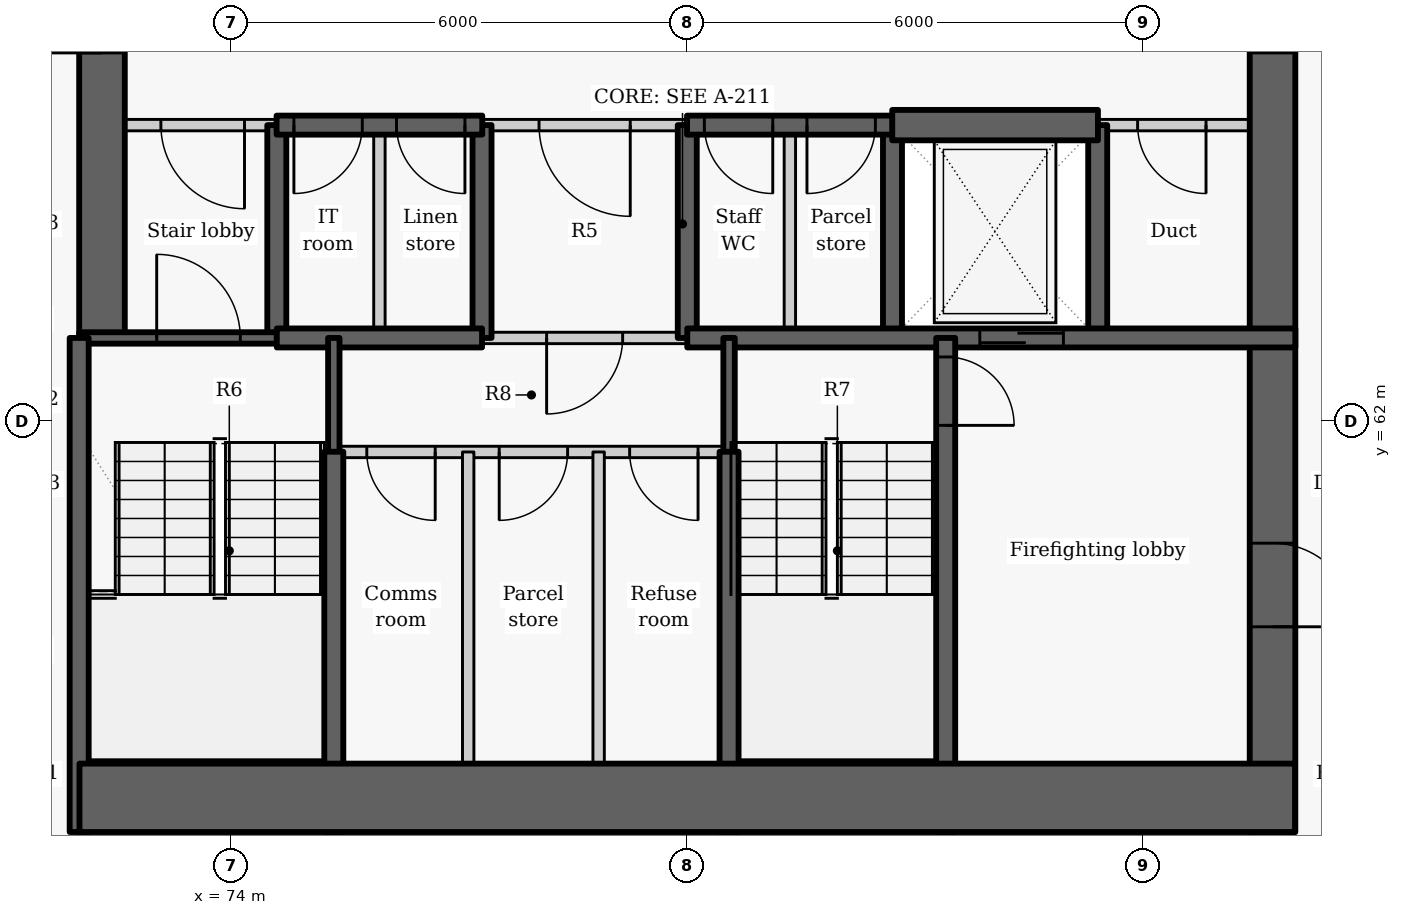
"""IFC4 building model, lengths in metres.
Left out: names, types, materials, properties, quantities, classifications, styles, units other than length and angle.
Written with IfcOpenShell. Run it as: python <this file> out.ifc"""

import sys

from ifc_helpers import new_model, si_unit, direction, frame, frame_2d, origin, place, context, subcontext, project, spatial, rectangle, extrude, element, fill, save


model = new_model("IFC4")
c1 = context("Model", 3, precision=1e-05, world=origin(), true_north=direction((0.0, 1.0)))
c2 = subcontext(c1, "Body", "Model", "MODEL_VIEW")
j1 = project(units=[si_unit("LENGTHUNIT", "METRE"), si_unit("PLANEANGLEUNIT", "RADIAN")], contexts=[c1])
p1 = place(None, origin())
s1 = spatial("IfcSite", under=j1, at=p1, CompositionType="ELEMENT")
p2 = place(p1, origin())
s2 = spatial("IfcBuilding", under=s1, at=p2, CompositionType="ELEMENT")
p3 = place(p2, frame((0.0, 0.0, 44.7)))
s3 = spatial("IfcBuildingStorey", under=s2, at=p3, CompositionType="ELEMENT", Elevation=44.7)
p4 = place(p3, frame((74.6, 63.1, -0.275), z_axis=(0.0, 0.0, 1.0), x_axis=(0.0, 1.0, 0.0)))
e1 = element("IfcWall", 1, at=p4, inside=s3, PredefinedType="SHEAR", context=c2, shape_type="SweptSolid", body=[
    extrude(rectangle(XDim=2.8, YDim=0.25, at=frame_2d((1.4, 0.0))), origin(), (0.0, 0.0, 1.0), 3.3),
])
p5 = place(p3, frame((72.3, 63.1, -0.275), z_axis=(0.0, 0.0, 1.0), x_axis=(0.0, 1.0, 0.0)))
e2 = element("IfcWall", 2, at=p5, inside=s3, PredefinedType="SHEAR", context=c2, shape_type="SweptSolid", body=[
    extrude(rectangle(XDim=9.1, YDim=0.6, at=frame_2d((4.55, 0.0))), origin(), (0.0, 0.0, 1.0), 3.3),
])
p6 = place(p5, frame((3.75, 0.0, 0.275)))
e3 = element("IfcOpeningElement", 3, at=p6, cuts=e2, PredefinedType="OPENING", context=c2, shape_type="SweptSolid", body=[
    extrude(rectangle(XDim=1.5, YDim=2.1, at=frame_2d((0.75, 1.05))), frame((0.0, 0.31, 0.0), z_axis=(0.0, -1.0, 0.0), x_axis=(1.0, 0.0, 0.0)), (0.0, 0.0, 1.0), 0.62),
])
for number, where, z_axis, x_axis in (
    (4, (77.3, 63.1, -0.275), (0.0, 0.0, 1.0), (0.0, 1.0, 0.0)),
    (5, (80.0, 63.1, -0.275), (0.0, 0.0, 1.0), (0.0, 1.0, 0.0)),
    (6, (82.7, 63.1, -0.275), (0.0, 0.0, 1.0), (0.0, 1.0, 0.0)),
    (7, (85.4, 63.1, -0.275), (0.0, 0.0, 1.0), (0.0, 1.0, 0.0)),
):
    element("IfcWall", number, at=place(p3, frame(where, z_axis=z_axis, x_axis=x_axis)), inside=s3, PredefinedType="SHEAR", context=c2, shape_type="SweptSolid", body=[
        extrude(rectangle(XDim=2.8, YDim=0.25, at=frame_2d((1.4, 0.0))), origin(), (0.0, 0.0, 1.0), 3.3),
    ])
p7 = place(p3, frame((87.7, 72.2, -0.275), z_axis=(0.0, 0.0, 1.0), x_axis=(0.0, -1.0, 0.0)))
e8 = element("IfcWall", 8, at=p7, inside=s3, PredefinedType="SHEAR", context=c2, shape_type="SweptSolid", body=[
    extrude(rectangle(XDim=15.6, YDim=0.6, at=frame_2d((7.8, 0.0))), origin(), (0.0, 0.0, 1.0), 3.3),
])
p8 = place(p7, frame((3.85, 0.0, 0.275)))
e9 = element("IfcOpeningElement", 9, at=p8, cuts=e8, PredefinedType="OPENING", context=c2, shape_type="SweptSolid", body=[
    extrude(rectangle(XDim=1.5, YDim=2.1, at=frame_2d((0.75, 1.05))), frame((0.0, 0.31, 0.0), z_axis=(0.0, -1.0, 0.0), x_axis=(1.0, 0.0, 0.0)), (0.0, 0.0, 1.0), 0.62),
])
p9 = place(p7, frame((11.8, 0.0, 0.275)))
e10 = element("IfcOpeningElement", 10, at=p9, cuts=e8, PredefinedType="OPENING", context=c2, shape_type="SweptSolid", body=[
    extrude(rectangle(XDim=1.1, YDim=2.1, at=frame_2d((0.55, 1.05))), frame((0.0, 0.31, 0.0), z_axis=(0.0, -1.0, 0.0), x_axis=(1.0, 0.0, 0.0)), (0.0, 0.0, 1.0), 0.62),
])
p10 = place(p3, frame((74.603, 65.9, 0.0), z_axis=(0.0, 0.0, 1.0), x_axis=(-1.0, 0.0, 0.0)))
e11 = element("IfcWall", 11, at=p10, inside=s3, PredefinedType="PARTITIONING", context=c2, shape_type="SweptSolid", body=[
    extrude(rectangle(XDim=2.603, YDim=0.15, at=frame_2d((1.302, 0.0))), origin(), (0.0, 0.0, 1.0), 3.025),
])
p11 = place(p10, frame((0.428, 0.0, 0.0)))
e12 = element("IfcOpeningElement", 12, at=p11, cuts=e11, PredefinedType="OPENING", context=c2, shape_type="SweptSolid", body=[
    extrude(rectangle(XDim=1.1, YDim=2.1, at=frame_2d((0.55, 1.05))), frame((0.0, 0.085, 0.0), z_axis=(0.0, -1.0, 0.0), x_axis=(1.0, 0.0, 0.0)), (0.0, 0.0, 1.0), 0.17),
])
p12 = place(p3, frame((80.003, 65.9, 0.0), z_axis=(0.0, 0.0, 1.0), x_axis=(-1.0, 0.0, 0.0)))
e13 = element("IfcWall", 13, at=p12, inside=s3, PredefinedType="PARTITIONING", context=c2, shape_type="SweptSolid", body=[
    extrude(rectangle(XDim=2.706, YDim=0.15, at=frame_2d((1.353, 0.0))), origin(), (0.0, 0.0, 1.0), 3.025),
])
p13 = place(p12, frame((0.753, 0.0, 0.0)))
e14 = element("IfcOpeningElement", 14, at=p13, cuts=e13, PredefinedType="OPENING", context=c2, shape_type="SweptSolid", body=[
    extrude(rectangle(XDim=1.2, YDim=2.1, at=frame_2d((0.6, 1.05))), frame((0.0, 0.085, 0.0), z_axis=(0.0, -1.0, 0.0), x_axis=(1.0, 0.0, 0.0)), (0.0, 0.0, 1.0), 0.17),
])
p14 = place(p3, frame((88.0, 65.9, 0.0), z_axis=(0.0, 0.0, 1.0), x_axis=(-1.0, 0.0, 0.0)))
e15 = element("IfcWall", 15, at=p14, inside=s3, PredefinedType="PARTITIONING", context=c2, shape_type="SweptSolid", body=[
    extrude(rectangle(XDim=2.603, YDim=0.15, at=frame_2d((1.302, 0.0))), origin(), (0.0, 0.0, 1.0), 3.025),
])
p15 = place(p14, frame((1.175, 0.0, 0.0)))
e16 = element("IfcOpeningElement", 16, at=p15, cuts=e15, PredefinedType="OPENING", context=c2, shape_type="SweptSolid", body=[
    extrude(rectangle(XDim=0.9, YDim=2.1, at=frame_2d((0.45, 1.05))), frame((0.0, 0.085, 0.0), z_axis=(0.0, -1.0, 0.0), x_axis=(1.0, 0.0, 0.0)), (0.0, 0.0, 1.0), 0.17),
])
p16 = place(p3, frame((77.303, 65.9, -0.275), z_axis=(0.0, 0.0, 1.0), x_axis=(-1.0, 0.0, 0.0)))
e17 = element("IfcWall", 17, at=p16, inside=s3, PredefinedType="SHEAR", context=c2, shape_type="SweptSolid", body=[
    extrude(rectangle(XDim=2.706, YDim=0.25, at=frame_2d((1.353, 0.0))), origin(), (0.0, 0.0, 1.0), 3.3),
])
p17 = place(p16, frame((1.578, 0.0, 0.275)))
e18 = element("IfcOpeningElement", 18, at=p17, cuts=e17, PredefinedType="OPENING", context=c2, shape_type="SweptSolid", body=[
    extrude(rectangle(XDim=0.9, YDim=2.1, at=frame_2d((0.45, 1.05))), frame((0.0, 0.135, 0.0), z_axis=(0.0, -1.0, 0.0), x_axis=(1.0, 0.0, 0.0)), (0.0, 0.0, 1.0), 0.27),
])
p18 = place(p16, frame((0.228, 0.0, 0.275)))
e19 = element("IfcOpeningElement", 19, at=p18, cuts=e17, PredefinedType="OPENING", context=c2, shape_type="SweptSolid", body=[
    extrude(rectangle(XDim=0.9, YDim=2.1, at=frame_2d((0.45, 1.05))), frame((0.0, 0.135, 0.0), z_axis=(0.0, -1.0, 0.0), x_axis=(1.0, 0.0, 0.0)), (0.0, 0.0, 1.0), 0.27),
])
p19 = place(p3, frame((82.703, 65.9, -0.275), z_axis=(0.0, 0.0, 1.0), x_axis=(-1.0, 0.0, 0.0)))
e20 = element("IfcWall", 20, at=p19, inside=s3, PredefinedType="SHEAR", context=c2, shape_type="SweptSolid", body=[
    extrude(rectangle(XDim=2.706, YDim=0.25, at=frame_2d((1.353, 0.0))), origin(), (0.0, 0.0, 1.0), 3.3),
])
p20 = place(p19, frame((1.578, 0.0, 0.275)))
e21 = element("IfcOpeningElement", 21, at=p20, cuts=e20, PredefinedType="OPENING", context=c2, shape_type="SweptSolid", body=[
    extrude(rectangle(XDim=0.9, YDim=2.1, at=frame_2d((0.45, 1.05))), frame((0.0, 0.135, 0.0), z_axis=(0.0, -1.0, 0.0), x_axis=(1.0, 0.0, 0.0)), (0.0, 0.0, 1.0), 0.27),
])
p21 = place(p19, frame((0.228, 0.0, 0.275)))
e22 = element("IfcOpeningElement", 22, at=p21, cuts=e20, PredefinedType="OPENING", context=c2, shape_type="SweptSolid", body=[
    extrude(rectangle(XDim=0.9, YDim=2.1, at=frame_2d((0.45, 1.05))), frame((0.0, 0.135, 0.0), z_axis=(0.0, -1.0, 0.0), x_axis=(1.0, 0.0, 0.0)), (0.0, 0.0, 1.0), 0.27),
])
p22 = place(p3, frame((82.697, 65.9, -0.275), z_axis=(0.0, 0.0, 1.0), x_axis=(1.0, 0.0, 0.0)))
e23 = element("IfcWall", 23, at=p22, inside=s3, PredefinedType="SHEAR", context=c2, shape_type="SweptSolid", body=[
    extrude(rectangle(XDim=2.706, YDim=0.4, at=frame_2d((1.353, 0.0))), origin(), (0.0, 0.0, 1.0), 3.3),
])
p23 = place(p3, frame((72.0, 63.1, -0.275), z_axis=(0.0, 0.0, 1.0), x_axis=(1.0, 0.0, 0.0)))
e24 = element("IfcWall", 24, at=p23, inside=s3, PredefinedType="SHEAR", context=c2, shape_type="SweptSolid", body=[
    extrude(rectangle(XDim=2.6, YDim=0.15, at=frame_2d((1.3, 0.0))), origin(), (0.0, 0.0, 1.0), 3.3),
])
p24 = place(p23, frame((1.02, 0.0, 0.275)))
e25 = element("IfcOpeningElement", 25, at=p24, cuts=e24, PredefinedType="OPENING", context=c2, shape_type="SweptSolid", body=[
    extrude(rectangle(XDim=1.1, YDim=2.1, at=frame_2d((0.55, 1.05))), frame((0.0, 0.085, 0.0), z_axis=(0.0, -1.0, 0.0), x_axis=(1.0, 0.0, 0.0)), (0.0, 0.0, 1.0), 0.17),
])
p25 = place(p3, frame((75.95, 63.1, 0.0), z_axis=(0.0, 0.0, 1.0), x_axis=(0.0, 1.0, 0.0)))
e26 = element("IfcWall", 26, at=p25, inside=s3, PredefinedType="PARTITIONING", context=c2, shape_type="SweptSolid", body=[
    extrude(rectangle(XDim=2.8, YDim=0.15, at=frame_2d((1.4, 0.0))), origin(), (0.0, 0.0, 1.0), 3.025),
])
p26 = place(p3, frame((74.6, 63.1, -0.275), z_axis=(0.0, 0.0, 1.0), x_axis=(1.0, 0.0, 0.0)))
e27 = element("IfcWall", 27, at=p26, inside=s3, PredefinedType="SHEAR", context=c2, shape_type="SweptSolid", body=[
    extrude(rectangle(XDim=2.7, YDim=0.25, at=frame_2d((1.35, 0.0))), origin(), (0.0, 0.0, 1.0), 3.3),
])
p27 = place(p3, frame((80.0, 63.1, -0.275), z_axis=(0.0, 0.0, 1.0), x_axis=(1.0, 0.0, 0.0)))
e28 = element("IfcWall", 28, at=p27, inside=s3, PredefinedType="SHEAR", context=c2, shape_type="SweptSolid", body=[
    extrude(rectangle(XDim=8.0, YDim=0.25, at=frame_2d((4.0, 0.0))), origin(), (0.0, 0.0, 1.0), 3.3),
])
p28 = place(p27, frame((3.849, 0.0, 0.275)))
e29 = element("IfcOpeningElement", 29, at=p28, cuts=e28, PredefinedType="OPENING", context=c2, shape_type="SweptSolid", body=[
    extrude(rectangle(XDim=1.1, YDim=2.1, at=frame_2d((0.55, 1.05))), frame((0.0, 0.135, 0.0), z_axis=(0.0, -1.0, 0.0), x_axis=(1.0, 0.0, 0.0)), (0.0, 0.0, 1.0), 0.27),
])
p29 = place(p3, frame((80.0, 63.1, 0.0), z_axis=(0.0, 0.0, 1.0), x_axis=(-1.0, 0.0, 0.0)))
e30 = element("IfcWall", 30, at=p29, inside=s3, PredefinedType="PARTITIONING", context=c2, shape_type="SweptSolid", body=[
    extrude(rectangle(XDim=2.7, YDim=0.15, at=frame_2d((1.35, 0.0))), origin(), (0.0, 0.0, 1.0), 3.025),
])
p30 = place(p29, frame((0.85, 0.0, 0.0)))
e31 = element("IfcOpeningElement", 31, at=p30, cuts=e30, PredefinedType="OPENING", context=c2, shape_type="SweptSolid", body=[
    extrude(rectangle(XDim=1.0, YDim=2.1, at=frame_2d((0.5, 1.05))), frame((0.0, 0.085, 0.0), z_axis=(0.0, -1.0, 0.0), x_axis=(1.0, 0.0, 0.0)), (0.0, 0.0, 1.0), 0.17),
])
p31 = place(p3, frame((81.35, 63.1, 0.0), z_axis=(0.0, 0.0, 1.0), x_axis=(0.0, 1.0, 0.0)))
e32 = element("IfcWall", 32, at=p31, inside=s3, PredefinedType="PARTITIONING", context=c2, shape_type="SweptSolid", body=[
    extrude(rectangle(XDim=2.8, YDim=0.15, at=frame_2d((1.4, 0.0))), origin(), (0.0, 0.0, 1.0), 3.025),
])
p32 = place(p3, frame((75.35, 61.597, -0.275), z_axis=(0.0, 0.0, 1.0), x_axis=(0.0, 1.0, 0.0)))
e33 = element("IfcWall", 33, at=p32, inside=s3, PredefinedType="SHEAR", context=c2, shape_type="SweptSolid", body=[
    extrude(rectangle(XDim=1.503, YDim=0.15, at=frame_2d((0.751, 0.0))), origin(), (0.0, 0.0, 1.0), 3.3),
])
p33 = place(p3, frame((75.35, 56.6, -0.275), z_axis=(0.0, 0.0, 1.0), x_axis=(0.0, 1.0, 0.0)))
e34 = element("IfcWall", 34, at=p33, inside=s3, PredefinedType="SHEAR", context=c2, shape_type="SweptSolid", body=[
    extrude(rectangle(XDim=5.003, YDim=0.25, at=frame_2d((2.501, 0.0))), origin(), (0.0, 0.0, 1.0), 3.3),
])
p34 = place(p3, frame((72.0, 56.6, -0.275), z_axis=(0.0, 0.0, 1.0), x_axis=(0.0, 1.0, 0.0)))
e35 = element("IfcWall", 35, at=p34, inside=s3, PredefinedType="SHEAR", context=c2, shape_type="SweptSolid", body=[
    extrude(rectangle(XDim=6.5, YDim=0.25, at=frame_2d((3.25, 0.0))), origin(), (0.0, 0.0, 1.0), 3.3),
])
p35 = place(p3, frame((83.4, 63.1, -0.275), z_axis=(0.0, 0.0, 1.0), x_axis=(0.0, -1.0, 0.0)))
e36 = element("IfcWall", 36, at=p35, inside=s3, PredefinedType="SHEAR", context=c2, shape_type="SweptSolid", body=[
    extrude(rectangle(XDim=6.5, YDim=0.25, at=frame_2d((3.25, 0.0))), origin(), (0.0, 0.0, 1.0), 3.3),
])
p36 = place(p35, frame((0.25, 0.0, 0.275)))
e37 = element("IfcOpeningElement", 37, at=p36, cuts=e36, PredefinedType="OPENING", context=c2, shape_type="SweptSolid", body=[
    extrude(rectangle(XDim=0.9, YDim=2.1, at=frame_2d((0.45, 1.05))), frame((0.0, 0.135, 0.0), z_axis=(0.0, -1.0, 0.0), x_axis=(1.0, 0.0, 0.0)), (0.0, 0.0, 1.0), 0.27),
])
p37 = place(p3, frame((80.55, 61.597, -0.275), z_axis=(0.0, 0.0, 1.0), x_axis=(0.0, 1.0, 0.0)))
e38 = element("IfcWall", 38, at=p37, inside=s3, PredefinedType="SHEAR", context=c2, shape_type="SweptSolid", body=[
    extrude(rectangle(XDim=1.503, YDim=0.15, at=frame_2d((0.751, 0.0))), origin(), (0.0, 0.0, 1.0), 3.3),
])
p38 = place(p3, frame((80.55, 56.6, -0.275), z_axis=(0.0, 0.0, 1.0), x_axis=(0.0, 1.0, 0.0)))
e39 = element("IfcWall", 39, at=p38, inside=s3, PredefinedType="SHEAR", context=c2, shape_type="SweptSolid", body=[
    extrude(rectangle(XDim=5.003, YDim=0.25, at=frame_2d((2.501, 0.0))), origin(), (0.0, 0.0, 1.0), 3.3),
])
p39 = place(p3, frame((80.55, 61.6, 0.0), z_axis=(0.0, 0.0, 1.0), x_axis=(-1.0, 0.0, 0.0)))
e40 = element("IfcWall", 40, at=p39, inside=s3, PredefinedType="PARTITIONING", context=c2, shape_type="SweptSolid", body=[
    extrude(rectangle(XDim=5.2, YDim=0.15, at=frame_2d((2.6, 0.0))), origin(), (0.0, 0.0, 1.0), 3.025),
])
p40 = place(p39, frame((3.866, 0.0, 0.0)))
e41 = element("IfcOpeningElement", 41, at=p40, cuts=e40, PredefinedType="OPENING", context=c2, shape_type="SweptSolid", body=[
    extrude(rectangle(XDim=0.9, YDim=2.1, at=frame_2d((0.45, 1.05))), frame((0.0, 0.085, 0.0), z_axis=(0.0, -1.0, 0.0), x_axis=(1.0, 0.0, 0.0)), (0.0, 0.0, 1.0), 0.17),
])
p41 = place(p39, frame((2.124, 0.0, 0.0)))
e42 = element("IfcOpeningElement", 42, at=p41, cuts=e40, PredefinedType="OPENING", context=c2, shape_type="SweptSolid", body=[
    extrude(rectangle(XDim=0.9, YDim=2.1, at=frame_2d((0.45, 1.05))), frame((0.0, 0.085, 0.0), z_axis=(0.0, -1.0, 0.0), x_axis=(1.0, 0.0, 0.0)), (0.0, 0.0, 1.0), 0.17),
])
p42 = place(p39, frame((0.408, 0.0, 0.0)))
e43 = element("IfcOpeningElement", 43, at=p42, cuts=e40, PredefinedType="OPENING", context=c2, shape_type="SweptSolid", body=[
    extrude(rectangle(XDim=0.9, YDim=2.1, at=frame_2d((0.45, 1.05))), frame((0.0, 0.085, 0.0), z_axis=(0.0, -1.0, 0.0), x_axis=(1.0, 0.0, 0.0)), (0.0, 0.0, 1.0), 0.17),
])
for number, where, z_axis, x_axis in (
    (44, (77.118, 56.6, 0.0), (0.0, 0.0, 1.0), (0.0, 1.0, 0.0)),
    (45, (78.834, 56.6, 0.0), (0.0, 0.0, 1.0), (0.0, 1.0, 0.0)),
):
    element("IfcWall", number, at=place(p3, frame(where, z_axis=z_axis, x_axis=x_axis)), inside=s3, PredefinedType="PARTITIONING", context=c2, shape_type="SweptSolid", body=[
        extrude(rectangle(XDim=5.0, YDim=0.15, at=frame_2d((2.5, 0.0))), origin(), (0.0, 0.0, 1.0), 3.025),
    ])
p43 = place(p3, frame((72.004, 57.05, -0.275), z_axis=(0.0, 0.0, 1.0), x_axis=(1.0, 0.0, 0.0)))
e46 = element("IfcWall", 46, at=p43, inside=s3, PredefinedType="SHEAR", context=c2, shape_type="SweptSolid", body=[
    extrude(rectangle(XDim=15.992, YDim=0.9, at=frame_2d((7.996, 0.0))), origin(), (0.0, 0.0, 1.0), 3.3),
])
p44 = place(p11, origin())
e47 = element("IfcDoor", 47, at=p44, inside=s3, OperationType="SINGLE_SWING_LEFT", PredefinedType="DOOR", context=c2, shape_type="SweptSolid", body=[
    extrude(rectangle(XDim=1.1, YDim=2.1, at=frame_2d((0.55, 1.05))), frame((0.0, 0.025, 0.0), z_axis=(0.0, -1.0, 0.0), x_axis=(1.0, 0.0, 0.0)), (0.0, 0.0, 1.0), 0.05),
])
fill(e12, e47)
p45 = place(p17, origin())
e48 = element("IfcDoor", 48, at=p45, inside=s3, OperationType="SINGLE_SWING_RIGHT", PredefinedType="DOOR", context=c2, shape_type="SweptSolid", body=[
    extrude(rectangle(XDim=0.9, YDim=2.1, at=frame_2d((0.45, 1.05))), frame((0.0, 0.025, 0.0), z_axis=(0.0, -1.0, 0.0), x_axis=(1.0, 0.0, 0.0)), (0.0, 0.0, 1.0), 0.05),
])
fill(e18, e48)
p46 = place(p18, origin())
e49 = element("IfcDoor", 49, at=p46, inside=s3, OperationType="SINGLE_SWING_LEFT", PredefinedType="DOOR", context=c2, shape_type="SweptSolid", body=[
    extrude(rectangle(XDim=0.9, YDim=2.1, at=frame_2d((0.45, 1.05))), frame((0.0, 0.025, 0.0), z_axis=(0.0, -1.0, 0.0), x_axis=(1.0, 0.0, 0.0)), (0.0, 0.0, 1.0), 0.05),
])
fill(e19, e49)
p47 = place(p13, origin())
e50 = element("IfcDoor", 50, at=p47, inside=s3, OperationType="DOUBLE_DOOR_SINGLE_SWING", PredefinedType="DOOR", context=c2, shape_type="SweptSolid", body=[
    extrude(rectangle(XDim=1.2, YDim=2.1, at=frame_2d((0.6, 1.05))), frame((0.0, 0.025, 0.0), z_axis=(0.0, -1.0, 0.0), x_axis=(1.0, 0.0, 0.0)), (0.0, 0.0, 1.0), 0.05),
])
fill(e14, e50)
p48 = place(p20, origin())
e51 = element("IfcDoor", 51, at=p48, inside=s3, OperationType="SINGLE_SWING_LEFT", PredefinedType="DOOR", context=c2, shape_type="SweptSolid", body=[
    extrude(rectangle(XDim=0.9, YDim=2.1, at=frame_2d((0.45, 1.05))), frame((0.0, 0.025, 0.0), z_axis=(0.0, -1.0, 0.0), x_axis=(1.0, 0.0, 0.0)), (0.0, 0.0, 1.0), 0.05),
])
fill(e21, e51)
p49 = place(p21, origin())
e52 = element("IfcDoor", 52, at=p49, inside=s3, OperationType="SINGLE_SWING_RIGHT", PredefinedType="DOOR", context=c2, shape_type="SweptSolid", body=[
    extrude(rectangle(XDim=0.9, YDim=2.1, at=frame_2d((0.45, 1.05))), frame((0.0, 0.025, 0.0), z_axis=(0.0, -1.0, 0.0), x_axis=(1.0, 0.0, 0.0)), (0.0, 0.0, 1.0), 0.05),
])
fill(e22, e52)
p50 = place(p28, origin())
e53 = element("IfcDoor", 53, at=p50, inside=s3, OperationType="SLIDING_TO_LEFT", PredefinedType="DOOR", context=c2, shape_type="SweptSolid", body=[
    extrude(rectangle(XDim=1.1, YDim=2.1, at=frame_2d((0.55, 1.05))), frame((0.0, 0.025, 0.0), z_axis=(0.0, -1.0, 0.0), x_axis=(1.0, 0.0, 0.0)), (0.0, 0.0, 1.0), 0.05),
])
fill(e29, e53)
p51 = place(p15, origin())
e54 = element("IfcDoor", 54, at=p51, inside=s3, OperationType="SINGLE_SWING_LEFT", PredefinedType="DOOR", context=c2, shape_type="SweptSolid", body=[
    extrude(rectangle(XDim=0.9, YDim=2.1, at=frame_2d((0.45, 1.05))), frame((0.0, 0.025, 0.0), z_axis=(0.0, -1.0, 0.0), x_axis=(1.0, 0.0, 0.0)), (0.0, 0.0, 1.0), 0.05),
])
fill(e16, e54)
p52 = place(p30, origin())
e55 = element("IfcDoor", 55, at=p52, inside=s3, OperationType="SINGLE_SWING_RIGHT", PredefinedType="DOOR", context=c2, shape_type="SweptSolid", body=[
    extrude(rectangle(XDim=1.0, YDim=2.1, at=frame_2d((0.5, 1.05))), frame((0.0, 0.025, 0.0), z_axis=(0.0, -1.0, 0.0), x_axis=(1.0, 0.0, 0.0)), (0.0, 0.0, 1.0), 0.05),
])
fill(e31, e55)
p53 = place(p40, origin())
e56 = element("IfcDoor", 56, at=p53, inside=s3, OperationType="SINGLE_SWING_LEFT", PredefinedType="DOOR", context=c2, shape_type="SweptSolid", body=[
    extrude(rectangle(XDim=0.9, YDim=2.1, at=frame_2d((0.45, 1.05))), frame((0.0, 0.025, 0.0), z_axis=(0.0, -1.0, 0.0), x_axis=(1.0, 0.0, 0.0)), (0.0, 0.0, 1.0), 0.05),
])
fill(e41, e56)
p54 = place(p41, origin())
e57 = element("IfcDoor", 57, at=p54, inside=s3, OperationType="SINGLE_SWING_RIGHT", PredefinedType="DOOR", context=c2, shape_type="SweptSolid", body=[
    extrude(rectangle(XDim=0.9, YDim=2.1, at=frame_2d((0.45, 1.05))), frame((0.0, 0.025, 0.0), z_axis=(0.0, -1.0, 0.0), x_axis=(1.0, 0.0, 0.0)), (0.0, 0.0, 1.0), 0.05),
])
fill(e42, e57)
p55 = place(p42, origin())
e58 = element("IfcDoor", 58, at=p55, inside=s3, OperationType="SINGLE_SWING_LEFT", PredefinedType="DOOR", context=c2, shape_type="SweptSolid", body=[
    extrude(rectangle(XDim=0.9, YDim=2.1, at=frame_2d((0.45, 1.05))), frame((0.0, 0.025, 0.0), z_axis=(0.0, -1.0, 0.0), x_axis=(1.0, 0.0, 0.0)), (0.0, 0.0, 1.0), 0.05),
])
fill(e43, e58)
p56 = place(p24, origin())
e59 = element("IfcDoor", 59, at=p56, inside=s3, OperationType="SINGLE_SWING_LEFT", PredefinedType="DOOR", context=c2, shape_type="SweptSolid", body=[
    extrude(rectangle(XDim=1.1, YDim=2.1, at=frame_2d((0.55, 1.05))), frame((0.0, 0.025, 0.0), z_axis=(0.0, -1.0, 0.0), x_axis=(1.0, 0.0, 0.0)), (0.0, 0.0, 1.0), 0.05),
])
fill(e25, e59)
p57 = place(p36, origin())
e60 = element("IfcDoor", 60, at=p57, inside=s3, OperationType="SINGLE_SWING_RIGHT", PredefinedType="DOOR", context=c2, shape_type="SweptSolid", body=[
    extrude(rectangle(XDim=0.9, YDim=2.1, at=frame_2d((0.45, 1.05))), frame((0.0, 0.025, 0.0), z_axis=(0.0, -1.0, 0.0), x_axis=(1.0, 0.0, 0.0)), (0.0, 0.0, 1.0), 0.05),
])
fill(e37, e60)
p58 = place(p8, origin())
e61 = element("IfcDoor", 61, at=p58, inside=s3, OperationType="DOUBLE_DOOR_SINGLE_SWING", PredefinedType="DOOR", context=c2, shape_type="SweptSolid", body=[
    extrude(rectangle(XDim=1.5, YDim=2.1, at=frame_2d((0.75, 1.05))), frame((0.0, 0.025, 0.0), z_axis=(0.0, -1.0, 0.0), x_axis=(1.0, 0.0, 0.0)), (0.0, 0.0, 1.0), 0.05),
])
fill(e9, e61)
p59 = place(p9, origin())
e62 = element("IfcDoor", 62, at=p59, inside=s3, OperationType="SINGLE_SWING_RIGHT", PredefinedType="DOOR", context=c2, shape_type="SweptSolid", body=[
    extrude(rectangle(XDim=1.1, YDim=2.1, at=frame_2d((0.55, 1.05))), frame((0.0, 0.025, 0.0), z_axis=(0.0, -1.0, 0.0), x_axis=(1.0, 0.0, 0.0)), (0.0, 0.0, 1.0), 0.05),
])
fill(e10, e62)
save(model, sys.argv[1])
